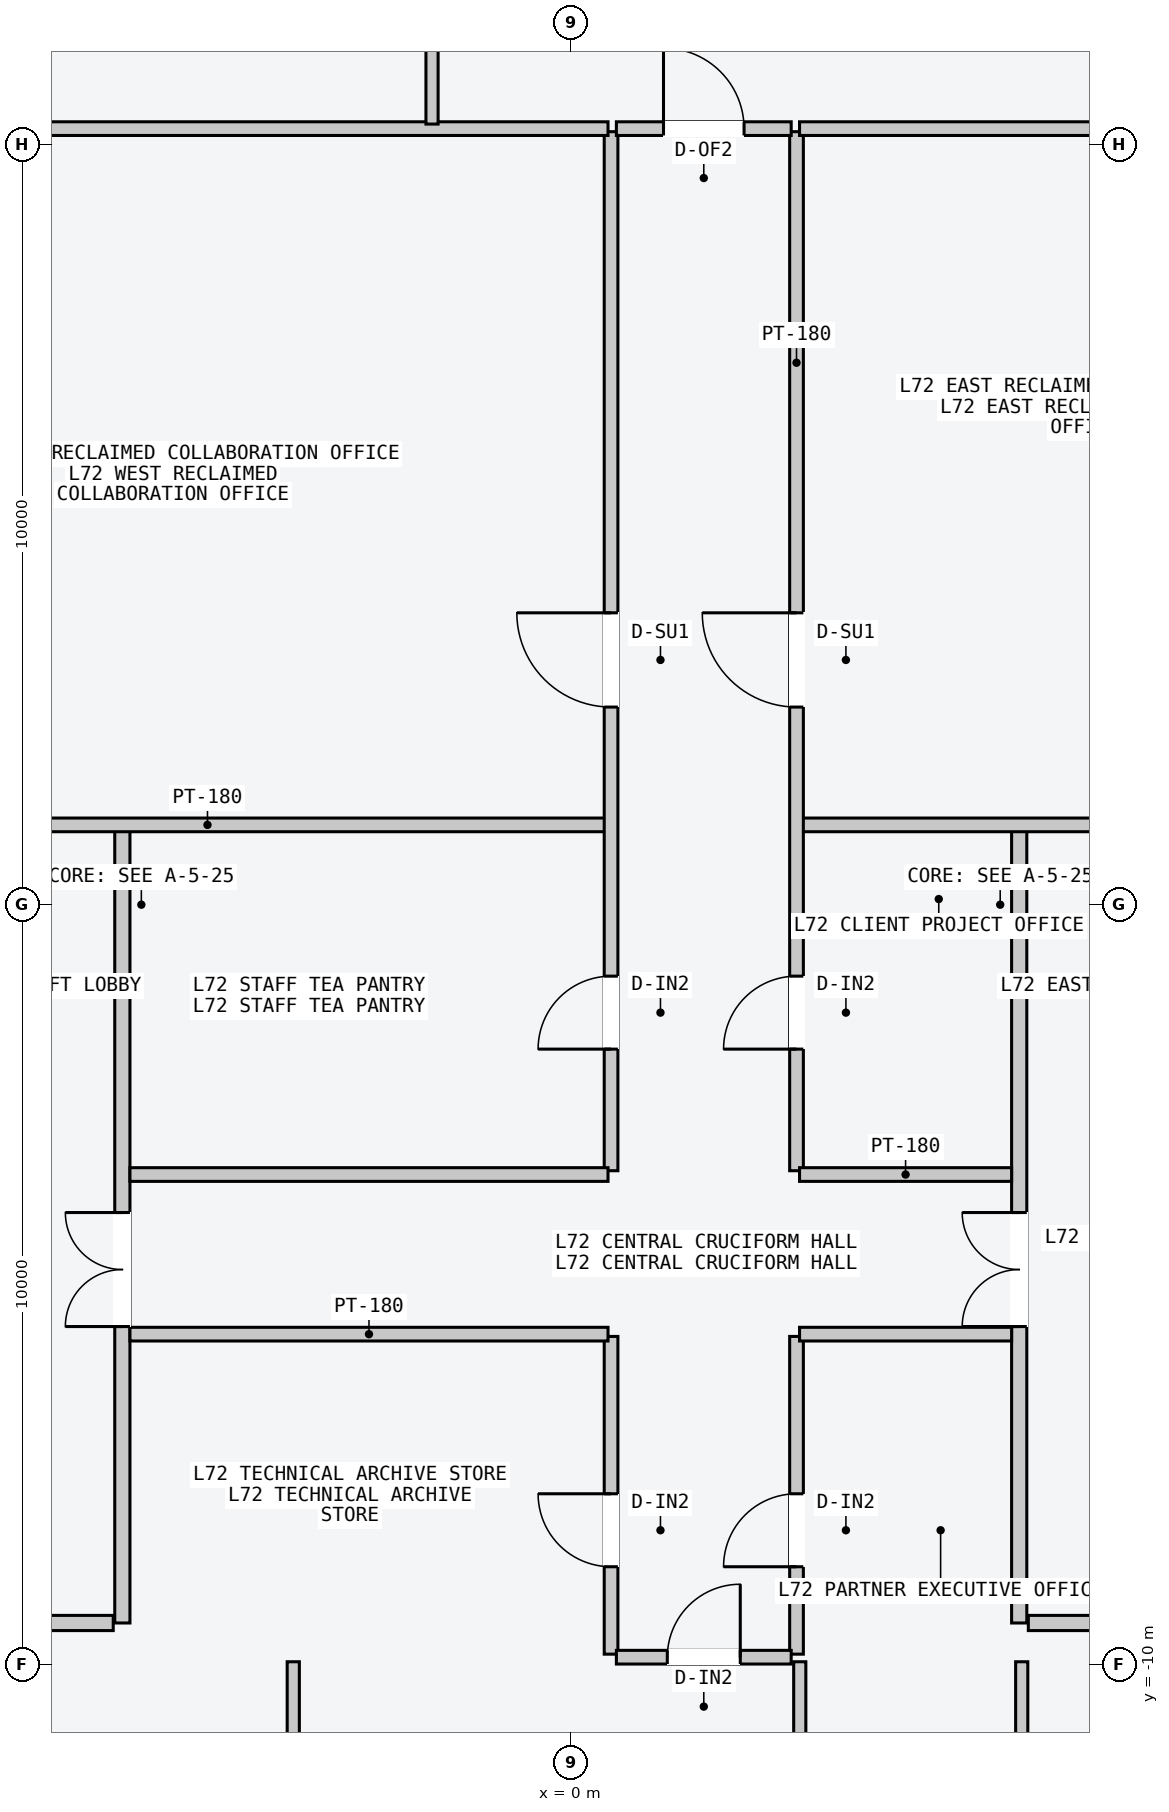
"""IFC4 building model, lengths in metres.
Left out: names, types, materials, properties, quantities, classifications, styles, units other than length and angle.
Written with IfcOpenShell. Run it as: python <this file> out.ifc"""

import sys

from ifc_helpers import new_model, si_unit, direction, frame, frame_2d, origin, place, context, subcontext, project, spatial, rectangle, extrude, element, fill, save


model = new_model("IFC4")
c1 = context("Model", 3, precision=1e-05, world=origin(), true_north=direction((0.0, 1.0)))
c2 = subcontext(c1, "Body", "Model", "MODEL_VIEW")
j1 = project(units=[si_unit("LENGTHUNIT", "METRE"), si_unit("PLANEANGLEUNIT", "RADIAN")], contexts=[c1])
p1 = place(None, origin())
s1 = spatial("IfcSite", under=j1, at=p1, CompositionType="ELEMENT")
p2 = place(p1, origin())
s2 = spatial("IfcBuilding", under=s1, at=p2, CompositionType="ELEMENT")
p3 = place(p2, frame((0.0, 0.0, 272.4)))
s3 = spatial("IfcBuildingStorey", under=s2, at=p3, CompositionType="ELEMENT", Elevation=272.4)
p4 = place(p3, frame((-5.9, -9.45, 0.0), z_axis=(0.0, 0.0, 1.0), x_axis=(0.0, 1.0, 0.0)))
e1 = element("IfcWall", 1, at=p4, inside=s3, PredefinedType="PARTITIONING", context=c2, shape_type="SweptSolid", body=[
    extrude(rectangle(XDim=10.5, YDim=0.2, at=frame_2d((5.25, 0.0))), origin(), (0.0, 0.0, 1.0), 3.4),
])
p5 = place(p4, frame((3.9, 0.0, 0.0)))
e2 = element("IfcOpeningElement", 2, at=p5, cuts=e1, PredefinedType="OPENING", context=c2, shape_type="SweptSolid", body=[
    extrude(rectangle(XDim=1.5, YDim=2.2, at=frame_2d((0.75, 1.1))), frame((0.0, 0.11, 0.0), z_axis=(0.0, -1.0, 0.0), x_axis=(1.0, 0.0, 0.0)), (0.0, 0.0, 1.0), 0.22),
])
p6 = place(p3, frame((-6.02, -9.45, 0.0), z_axis=(0.0, 0.0, 1.0), x_axis=(-1.0, 0.0, 0.0)))
e3 = element("IfcWall", 3, at=p6, inside=s3, PredefinedType="PARTITIONING", context=c2, shape_type="SweptSolid", body=[
    extrude(rectangle(XDim=1.8, YDim=0.2, at=frame_2d((0.9, 0.0))), origin(), (0.0, 0.0, 1.0), 3.4),
])
p7 = place(p3, frame((5.9, -9.45, 0.0), z_axis=(0.0, 0.0, 1.0), x_axis=(0.0, 1.0, 0.0)))
e4 = element("IfcWall", 4, at=p7, inside=s3, PredefinedType="PARTITIONING", context=c2, shape_type="SweptSolid", body=[
    extrude(rectangle(XDim=10.5, YDim=0.2, at=frame_2d((5.25, 0.0))), origin(), (0.0, 0.0, 1.0), 3.4),
])
p8 = place(p7, frame((3.9, 0.0, 0.0)))
e5 = element("IfcOpeningElement", 5, at=p8, cuts=e4, PredefinedType="OPENING", context=c2, shape_type="SweptSolid", body=[
    extrude(rectangle(XDim=1.5, YDim=2.2, at=frame_2d((0.75, 1.1))), frame((0.0, 0.11, 0.0), z_axis=(0.0, -1.0, 0.0), x_axis=(1.0, 0.0, 0.0)), (0.0, 0.0, 1.0), 0.22),
])
p9 = place(p3, frame((6.02, -9.45, 0.0), z_axis=(0.0, 0.0, 1.0), x_axis=(1.0, 0.0, 0.0)))
e6 = element("IfcWall", 6, at=p9, inside=s3, PredefinedType="PARTITIONING", context=c2, shape_type="SweptSolid", body=[
    extrude(rectangle(XDim=1.8, YDim=0.2, at=frame_2d((0.9, 0.0))), origin(), (0.0, 0.0, 1.0), 3.4),
])
p10 = place(p3, frame((-10.05, 1.05, 0.0), z_axis=(0.0, 0.0, 1.0), x_axis=(1.0, 0.0, 0.0)))
e7 = element("IfcWall", 7, at=p10, inside=s3, PredefinedType="PARTITIONING", context=c2, shape_type="SweptSolid", body=[
    extrude(rectangle(XDim=10.54, YDim=0.18, at=frame_2d((5.27, 0.0))), origin(), (0.0, 0.0, 1.0), 3.4),
])
p11 = place(p3, frame((0.53, -3.5, 0.0), z_axis=(0.0, 0.0, 1.0), x_axis=(0.0, 1.0, 0.0)))
e8 = element("IfcWall", 8, at=p11, inside=s3, PredefinedType="PARTITIONING", context=c2, shape_type="SweptSolid", body=[
    extrude(rectangle(XDim=13.67, YDim=0.18, at=frame_2d((6.835, 0.0))), origin(), (0.0, 0.0, 1.0), 3.4),
])
p12 = place(p11, frame((6.1, 0.0, 0.0)))
e9 = element("IfcOpeningElement", 9, at=p12, cuts=e8, PredefinedType="OPENING", context=c2, shape_type="SweptSolid", body=[
    extrude(rectangle(XDim=1.24, YDim=2.24, at=frame_2d((0.62, 1.12))), frame((0.0, 0.1, 0.0), z_axis=(0.0, -1.0, 0.0), x_axis=(1.0, 0.0, 0.0)), (0.0, 0.0, 1.0), 0.2),
])
p13 = place(p11, frame((1.6, 0.0, 0.0)))
e10 = element("IfcOpeningElement", 10, at=p13, cuts=e8, PredefinedType="OPENING", context=c2, shape_type="SweptSolid", body=[
    extrude(rectangle(XDim=0.96, YDim=2.18, at=frame_2d((0.48, 1.09))), frame((0.0, 0.1, 0.0), z_axis=(0.0, -1.0, 0.0), x_axis=(1.0, 0.0, 0.0)), (0.0, 0.0, 1.0), 0.2),
])
p14 = place(p3, frame((-7.5, 10.21, 0.0), z_axis=(0.0, 0.0, 1.0), x_axis=(1.0, 0.0, 0.0)))
e11 = element("IfcWall", 11, at=p14, inside=s3, PredefinedType="PARTITIONING", context=c2, shape_type="SweptSolid", body=[
    extrude(rectangle(XDim=7.99, YDim=0.18, at=frame_2d((3.995, 0.0))), origin(), (0.0, 0.0, 1.0), 3.4),
])
p15 = place(p3, frame((-5.8, -3.55, 0.0), z_axis=(0.0, 0.0, 1.0), x_axis=(1.0, 0.0, 0.0)))
e12 = element("IfcWall", 12, at=p15, inside=s3, PredefinedType="PARTITIONING", context=c2, shape_type="SweptSolid", body=[
    extrude(rectangle(XDim=6.29, YDim=0.18, at=frame_2d((3.145, 0.0))), origin(), (0.0, 0.0, 1.0), 3.4),
])
p16 = place(p3, frame((3.01, 1.05, 0.0), z_axis=(0.0, 0.0, 1.0), x_axis=(1.0, 0.0, 0.0)))
e13 = element("IfcWall", 13, at=p16, inside=s3, PredefinedType="PARTITIONING", context=c2, shape_type="SweptSolid", body=[
    extrude(rectangle(XDim=7.05, YDim=0.18, at=frame_2d((3.525, 0.0))), origin(), (0.0, 0.0, 1.0), 3.4),
])
p17 = place(p3, frame((2.97, -3.5, 0.0), z_axis=(0.0, 0.0, 1.0), x_axis=(0.0, 1.0, 0.0)))
e14 = element("IfcWall", 14, at=p17, inside=s3, PredefinedType="PARTITIONING", context=c2, shape_type="SweptSolid", body=[
    extrude(rectangle(XDim=13.67, YDim=0.18, at=frame_2d((6.835, 0.0))), origin(), (0.0, 0.0, 1.0), 3.4),
])
p18 = place(p17, frame((6.1, 0.0, 0.0)))
e15 = element("IfcOpeningElement", 15, at=p18, cuts=e14, PredefinedType="OPENING", context=c2, shape_type="SweptSolid", body=[
    extrude(rectangle(XDim=1.24, YDim=2.24, at=frame_2d((0.62, 1.12))), frame((0.0, 0.1, 0.0), z_axis=(0.0, -1.0, 0.0), x_axis=(1.0, 0.0, 0.0)), (0.0, 0.0, 1.0), 0.2),
])
p19 = place(p17, frame((1.6, 0.0, 0.0)))
e16 = element("IfcOpeningElement", 16, at=p19, cuts=e14, PredefinedType="OPENING", context=c2, shape_type="SweptSolid", body=[
    extrude(rectangle(XDim=0.96, YDim=2.18, at=frame_2d((0.48, 1.09))), frame((0.0, 0.1, 0.0), z_axis=(0.0, -1.0, 0.0), x_axis=(1.0, 0.0, 0.0)), (0.0, 0.0, 1.0), 0.2),
])
p20 = place(p3, frame((3.01, 10.21, 0.0), z_axis=(0.0, 0.0, 1.0), x_axis=(1.0, 0.0, 0.0)))
e17 = element("IfcWall", 17, at=p20, inside=s3, PredefinedType="PARTITIONING", context=c2, shape_type="SweptSolid", body=[
    extrude(rectangle(XDim=4.49, YDim=0.18, at=frame_2d((2.245, 0.0))), origin(), (0.0, 0.0, 1.0), 3.4),
])
p21 = place(p3, frame((3.01, -3.55, 0.0), z_axis=(0.0, 0.0, 1.0), x_axis=(1.0, 0.0, 0.0)))
e18 = element("IfcWall", 18, at=p21, inside=s3, PredefinedType="PARTITIONING", context=c2, shape_type="SweptSolid", body=[
    extrude(rectangle(XDim=2.79, YDim=0.18, at=frame_2d((1.395, 0.0))), origin(), (0.0, 0.0, 1.0), 3.4),
])
p22 = place(p3, frame((0.53, -9.86, 0.0), z_axis=(0.0, 0.0, 1.0), x_axis=(0.0, 1.0, 0.0)))
e19 = element("IfcWall", 19, at=p22, inside=s3, PredefinedType="PARTITIONING", context=c2, shape_type="SweptSolid", body=[
    extrude(rectangle(XDim=4.18, YDim=0.18, at=frame_2d((2.09, 0.0))), origin(), (0.0, 0.0, 1.0), 3.4),
])
p23 = place(p22, frame((1.15, 0.0, 0.0)))
e20 = element("IfcOpeningElement", 20, at=p23, cuts=e19, PredefinedType="OPENING", context=c2, shape_type="SweptSolid", body=[
    extrude(rectangle(XDim=0.96, YDim=2.18, at=frame_2d((0.48, 1.09))), frame((0.0, 0.1, 0.0), z_axis=(0.0, -1.0, 0.0), x_axis=(1.0, 0.0, 0.0)), (0.0, 0.0, 1.0), 0.2),
])
p24 = place(p3, frame((2.97, -9.86, 0.0), z_axis=(0.0, 0.0, 1.0), x_axis=(0.0, 1.0, 0.0)))
e21 = element("IfcWall", 21, at=p24, inside=s3, PredefinedType="PARTITIONING", context=c2, shape_type="SweptSolid", body=[
    extrude(rectangle(XDim=4.18, YDim=0.18, at=frame_2d((2.09, 0.0))), origin(), (0.0, 0.0, 1.0), 3.4),
])
p25 = place(p24, frame((1.15, 0.0, 0.0)))
e22 = element("IfcOpeningElement", 22, at=p25, cuts=e21, PredefinedType="OPENING", context=c2, shape_type="SweptSolid", body=[
    extrude(rectangle(XDim=0.96, YDim=2.18, at=frame_2d((0.48, 1.09))), frame((0.0, 0.1, 0.0), z_axis=(0.0, -1.0, 0.0), x_axis=(1.0, 0.0, 0.0)), (0.0, 0.0, 1.0), 0.2),
])
p26 = place(p3, frame((-5.8, -5.65, 0.0), z_axis=(0.0, 0.0, 1.0), x_axis=(1.0, 0.0, 0.0)))
e23 = element("IfcWall", 23, at=p26, inside=s3, PredefinedType="PARTITIONING", context=c2, shape_type="SweptSolid", body=[
    extrude(rectangle(XDim=6.29, YDim=0.18, at=frame_2d((3.145, 0.0))), origin(), (0.0, 0.0, 1.0), 3.4),
])
p27 = place(p3, frame((3.01, -5.65, 0.0), z_axis=(0.0, 0.0, 1.0), x_axis=(1.0, 0.0, 0.0)))
e24 = element("IfcWall", 24, at=p27, inside=s3, PredefinedType="PARTITIONING", context=c2, shape_type="SweptSolid", body=[
    extrude(rectangle(XDim=2.79, YDim=0.18, at=frame_2d((1.395, 0.0))), origin(), (0.0, 0.0, 1.0), 3.4),
])
p28 = place(p3, frame((-1.826, 10.27, 0.0), z_axis=(0.0, 0.0, 1.0), x_axis=(0.0, 1.0, 0.0)))
e25 = element("IfcWall", 25, at=p28, inside=s3, PredefinedType="PARTITIONING", context=c2, shape_type="SweptSolid", body=[
    extrude(rectangle(XDim=7.29, YDim=0.16, at=frame_2d((3.645, 0.0))), origin(), (0.0, 0.0, 1.0), 3.4),
])
p29 = place(p28, frame((1.15, 0.0, 0.0)))
e26 = element("IfcOpeningElement", 26, at=p29, cuts=e25, PredefinedType="OPENING", context=c2, shape_type="SweptSolid", body=[
    extrude(rectangle(XDim=0.96, YDim=2.18, at=frame_2d((0.48, 1.09))), frame((0.0, 0.09, 0.0), z_axis=(0.0, -1.0, 0.0), x_axis=(1.0, 0.0, 0.0)), (0.0, 0.0, 1.0), 0.18),
])
p30 = place(p3, frame((0.6, 10.21, 0.0), z_axis=(0.0, 0.0, 1.0), x_axis=(1.0, 0.0, 0.0)))
e27 = element("IfcWall", 27, at=p30, inside=s3, PredefinedType="PARTITIONING", context=c2, shape_type="SweptSolid", body=[
    extrude(rectangle(XDim=2.3, YDim=0.18, at=frame_2d((1.15, 0.0))), origin(), (0.0, 0.0, 1.0), 3.4),
])
p31 = place(p30, frame((0.62, 0.0, 0.0)))
e28 = element("IfcOpeningElement", 28, at=p31, cuts=e27, PredefinedType="OPENING", context=c2, shape_type="SweptSolid", body=[
    extrude(rectangle(XDim=1.06, YDim=2.2, at=frame_2d((0.53, 1.1))), frame((0.0, 0.1, 0.0), z_axis=(0.0, -1.0, 0.0), x_axis=(1.0, 0.0, 0.0)), (0.0, 0.0, 1.0), 0.2),
])
p32 = place(p3, frame((-3.651, -17.56, 0.0), z_axis=(0.0, 0.0, 1.0), x_axis=(0.0, 1.0, 0.0)))
e29 = element("IfcWall", 29, at=p32, inside=s3, PredefinedType="PARTITIONING", context=c2, shape_type="SweptSolid", body=[
    extrude(rectangle(XDim=7.6, YDim=0.16, at=frame_2d((3.8, 0.0))), origin(), (0.0, 0.0, 1.0), 3.4),
])
p33 = place(p32, frame((1.05, 0.0, 0.0)))
e30 = element("IfcOpeningElement", 30, at=p33, cuts=e29, PredefinedType="OPENING", context=c2, shape_type="SweptSolid", body=[
    extrude(rectangle(XDim=0.96, YDim=2.18, at=frame_2d((0.48, 1.09))), frame((0.0, 0.09, 0.0), z_axis=(0.0, -1.0, 0.0), x_axis=(1.0, 0.0, 0.0)), (0.0, 0.0, 1.0), 0.18),
])
p34 = place(p3, frame((3.013, -17.56, 0.0), z_axis=(0.0, 0.0, 1.0), x_axis=(0.0, 1.0, 0.0)))
e31 = element("IfcWall", 31, at=p34, inside=s3, PredefinedType="PARTITIONING", context=c2, shape_type="SweptSolid", body=[
    extrude(rectangle(XDim=7.6, YDim=0.16, at=frame_2d((3.8, 0.0))), origin(), (0.0, 0.0, 1.0), 3.4),
])
p35 = place(p34, frame((1.05, 0.0, 0.0)))
e32 = element("IfcOpeningElement", 32, at=p35, cuts=e31, PredefinedType="OPENING", context=c2, shape_type="SweptSolid", body=[
    extrude(rectangle(XDim=0.96, YDim=2.18, at=frame_2d((0.48, 1.09))), frame((0.0, 0.09, 0.0), z_axis=(0.0, -1.0, 0.0), x_axis=(1.0, 0.0, 0.0)), (0.0, 0.0, 1.0), 0.18),
])
p36 = place(p3, frame((5.933, -17.56, 0.0), z_axis=(0.0, 0.0, 1.0), x_axis=(0.0, 1.0, 0.0)))
e33 = element("IfcWall", 33, at=p36, inside=s3, PredefinedType="PARTITIONING", context=c2, shape_type="SweptSolid", body=[
    extrude(rectangle(XDim=7.6, YDim=0.16, at=frame_2d((3.8, 0.0))), origin(), (0.0, 0.0, 1.0), 3.4),
])
p37 = place(p36, frame((1.05, 0.0, 0.0)))
e34 = element("IfcOpeningElement", 34, at=p37, cuts=e33, PredefinedType="OPENING", context=c2, shape_type="SweptSolid", body=[
    extrude(rectangle(XDim=0.96, YDim=2.18, at=frame_2d((0.48, 1.09))), frame((0.0, 0.09, 0.0), z_axis=(0.0, -1.0, 0.0), x_axis=(1.0, 0.0, 0.0)), (0.0, 0.0, 1.0), 0.18),
])
p38 = place(p3, frame((0.6, -9.9, 0.0), z_axis=(0.0, 0.0, 1.0), x_axis=(1.0, 0.0, 0.0)))
e35 = element("IfcWall", 35, at=p38, inside=s3, PredefinedType="PARTITIONING", context=c2, shape_type="SweptSolid", body=[
    extrude(rectangle(XDim=2.3, YDim=0.18, at=frame_2d((1.15, 0.0))), origin(), (0.0, 0.0, 1.0), 3.4),
])
p39 = place(p38, frame((0.67, 0.0, 0.0)))
e36 = element("IfcOpeningElement", 36, at=p39, cuts=e35, PredefinedType="OPENING", context=c2, shape_type="SweptSolid", body=[
    extrude(rectangle(XDim=0.96, YDim=2.18, at=frame_2d((0.48, 1.09))), frame((0.0, 0.1, 0.0), z_axis=(0.0, -1.0, 0.0), x_axis=(1.0, 0.0, 0.0)), (0.0, 0.0, 1.0), 0.2),
])
p40 = place(p5, origin())
e37 = element("IfcDoor", 37, at=p40, inside=s3, OperationType="DOUBLE_DOOR_SINGLE_SWING", PredefinedType="DOOR", context=c2, shape_type="SweptSolid", body=[
    extrude(rectangle(XDim=1.5, YDim=2.2, at=frame_2d((0.75, 1.1))), frame((0.0, 0.025, 0.0), z_axis=(0.0, -1.0, 0.0), x_axis=(1.0, 0.0, 0.0)), (0.0, 0.0, 1.0), 0.05),
])
fill(e2, e37)
p41 = place(p8, origin())
e38 = element("IfcDoor", 38, at=p41, inside=s3, OperationType="DOUBLE_DOOR_SINGLE_SWING", PredefinedType="DOOR", context=c2, shape_type="SweptSolid", body=[
    extrude(rectangle(XDim=1.5, YDim=2.2, at=frame_2d((0.75, 1.1))), frame((0.0, 0.025, 0.0), z_axis=(0.0, -1.0, 0.0), x_axis=(1.0, 0.0, 0.0)), (0.0, 0.0, 1.0), 0.05),
])
fill(e5, e38)
p42 = place(p12, origin())
e39 = element("IfcDoor", 39, at=p42, inside=s3, OperationType="SINGLE_SWING_RIGHT", PredefinedType="DOOR", context=c2, shape_type="SweptSolid", body=[
    extrude(rectangle(XDim=1.24, YDim=2.24, at=frame_2d((0.62, 1.12))), frame((0.0, 0.025, 0.0), z_axis=(0.0, -1.0, 0.0), x_axis=(1.0, 0.0, 0.0)), (0.0, 0.0, 1.0), 0.05),
])
fill(e9, e39)
p43 = place(p13, origin())
e40 = element("IfcDoor", 40, at=p43, inside=s3, OperationType="SINGLE_SWING_LEFT", PredefinedType="DOOR", context=c2, shape_type="SweptSolid", body=[
    extrude(rectangle(XDim=0.96, YDim=2.18, at=frame_2d((0.48, 1.09))), frame((0.0, 0.025, 0.0), z_axis=(0.0, -1.0, 0.0), x_axis=(1.0, 0.0, 0.0)), (0.0, 0.0, 1.0), 0.05),
])
fill(e10, e40)
p44 = place(p18, origin())
e41 = element("IfcDoor", 41, at=p44, inside=s3, OperationType="SINGLE_SWING_RIGHT", PredefinedType="DOOR", context=c2, shape_type="SweptSolid", body=[
    extrude(rectangle(XDim=1.24, YDim=2.24, at=frame_2d((0.62, 1.12))), frame((0.0, 0.025, 0.0), z_axis=(0.0, -1.0, 0.0), x_axis=(1.0, 0.0, 0.0)), (0.0, 0.0, 1.0), 0.05),
])
fill(e15, e41)
p45 = place(p19, origin())
e42 = element("IfcDoor", 42, at=p45, inside=s3, OperationType="SINGLE_SWING_LEFT", PredefinedType="DOOR", context=c2, shape_type="SweptSolid", body=[
    extrude(rectangle(XDim=0.96, YDim=2.18, at=frame_2d((0.48, 1.09))), frame((0.0, 0.025, 0.0), z_axis=(0.0, -1.0, 0.0), x_axis=(1.0, 0.0, 0.0)), (0.0, 0.0, 1.0), 0.05),
])
fill(e16, e42)
p46 = place(p23, origin())
e43 = element("IfcDoor", 43, at=p46, inside=s3, OperationType="SINGLE_SWING_RIGHT", PredefinedType="DOOR", context=c2, shape_type="SweptSolid", body=[
    extrude(rectangle(XDim=0.96, YDim=2.18, at=frame_2d((0.48, 1.09))), frame((0.0, 0.025, 0.0), z_axis=(0.0, -1.0, 0.0), x_axis=(1.0, 0.0, 0.0)), (0.0, 0.0, 1.0), 0.05),
])
fill(e20, e43)
p47 = place(p25, origin())
e44 = element("IfcDoor", 44, at=p47, inside=s3, OperationType="SINGLE_SWING_LEFT", PredefinedType="DOOR", context=c2, shape_type="SweptSolid", body=[
    extrude(rectangle(XDim=0.96, YDim=2.18, at=frame_2d((0.48, 1.09))), frame((0.0, 0.025, 0.0), z_axis=(0.0, -1.0, 0.0), x_axis=(1.0, 0.0, 0.0)), (0.0, 0.0, 1.0), 0.05),
])
fill(e22, e44)
p48 = place(p31, origin())
e45 = element("IfcDoor", 45, at=p48, inside=s3, OperationType="SINGLE_SWING_LEFT", PredefinedType="DOOR", context=c2, shape_type="SweptSolid", body=[
    extrude(rectangle(XDim=1.06, YDim=2.2, at=frame_2d((0.53, 1.1))), frame((0.0, 0.025, 0.0), z_axis=(0.0, -1.0, 0.0), x_axis=(1.0, 0.0, 0.0)), (0.0, 0.0, 1.0), 0.05),
])
fill(e28, e45)
p49 = place(p39, origin())
e46 = element("IfcDoor", 46, at=p49, inside=s3, OperationType="SINGLE_SWING_RIGHT", PredefinedType="DOOR", context=c2, shape_type="SweptSolid", body=[
    extrude(rectangle(XDim=0.96, YDim=2.18, at=frame_2d((0.48, 1.09))), frame((0.0, 0.025, 0.0), z_axis=(0.0, -1.0, 0.0), x_axis=(1.0, 0.0, 0.0)), (0.0, 0.0, 1.0), 0.05),
])
fill(e36, e46)
save(model, sys.argv[1])
